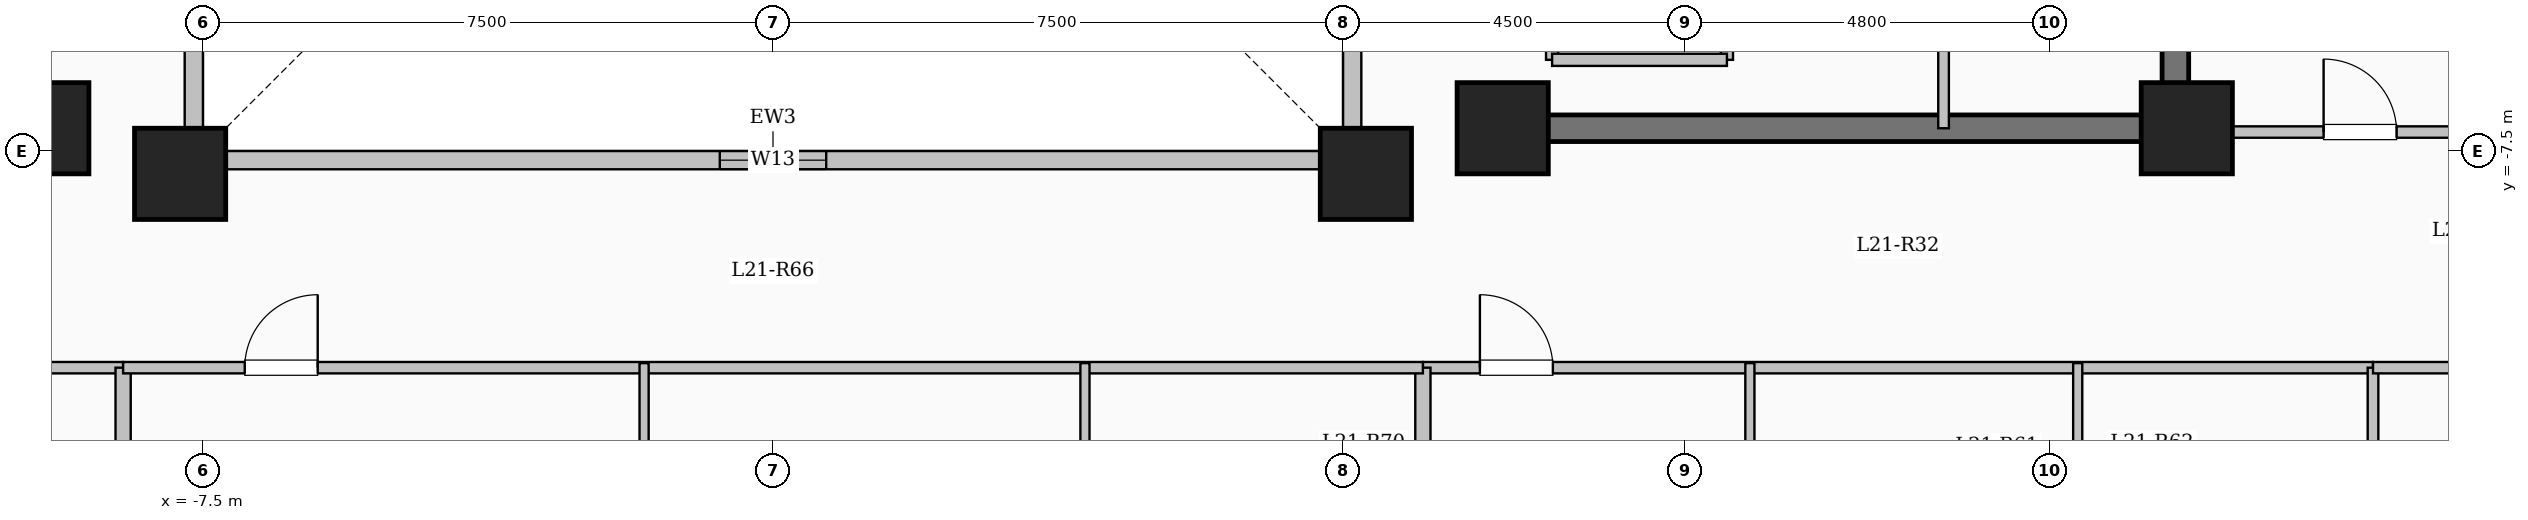
"""IFC4 building model, lengths in metres.
Left out: names, types, materials, properties, quantities, classifications, styles, units other than length and angle.
Written with IfcOpenShell. Run it as: python <this file> out.ifc"""

import sys

from ifc_helpers import new_model, si_unit, direction, frame, frame_2d, origin, origin_2d, place, context, subcontext, project, spatial, rectangle, extrude, element, fill, save


model = new_model("IFC4")
c1 = context("Model", 3, precision=1e-05, world=origin(), true_north=direction((0.0, 1.0)))
c2 = subcontext(c1, "Body", "Model", "MODEL_VIEW")
j1 = project(units=[si_unit("LENGTHUNIT", "METRE"), si_unit("PLANEANGLEUNIT", "RADIAN")], contexts=[c1])
p1 = place(None, origin())
s1 = spatial("IfcSite", under=j1, at=p1, CompositionType="ELEMENT")
p2 = place(p1, origin())
s2 = spatial("IfcBuilding", under=s1, at=p2, CompositionType="ELEMENT")
p3 = place(p2, frame((0.0, 0.0, 81.65)))
s3 = spatial("IfcBuildingStorey", under=s2, at=p3, CompositionType="ELEMENT", Elevation=81.65)
for number, where, z_axis, x_axis in (
    (1, (-7.8, -7.8, 0.0), (0.0, 0.0, 1.0), (1.0, 0.0, 0.0)),
    (2, (7.8, -7.8, 0.0), (0.0, 0.0, 1.0), (1.0, 0.0, 0.0)),
    (3, (-9.6, -7.2, 0.0), (0.0, 0.0, 1.0), (1.0, 0.0, 0.0)),
    (4, (9.6, -7.2, 0.0), (0.0, 0.0, 1.0), (1.0, 0.0, 0.0)),
    (5, (18.6, -7.2, 0.0), (0.0, 0.0, 1.0), (1.0, 0.0, 0.0)),
):
    element("IfcColumn", number, at=place(p3, frame(where, z_axis=z_axis, x_axis=x_axis)), inside=s3, PredefinedType="COLUMN", context=c2, shape_type="SweptSolid", body=[
        extrude(rectangle(XDim=1.2, YDim=1.2, at=origin_2d()), origin(), (0.0, 0.0, 1.0), 3.35),
    ])
p4 = place(p3, frame((-7.62, -7.62, 0.0), z_axis=(0.0, 0.0, 1.0), x_axis=(1.0, 0.0, 0.0)))
e6 = element("IfcWall", 6, at=p4, inside=s3, PredefinedType="SOLIDWALL", context=c2, shape_type="SweptSolid", body=[
    extrude(rectangle(XDim=15.24, YDim=0.24, at=frame_2d((7.62, 0.0))), origin(), (0.0, 0.0, 1.0), 3.1),
])
p5 = place(p4, frame((6.92, 0.0, 0.95)))
e7 = element("IfcOpeningElement", 7, at=p5, cuts=e6, PredefinedType="OPENING", context=c2, shape_type="SweptSolid", body=[
    extrude(rectangle(XDim=1.4, YDim=1.5, at=frame_2d((0.7, 0.75))), frame((0.0, 0.13, 0.0), z_axis=(0.0, -1.0, 0.0), x_axis=(1.0, 0.0, 0.0)), (0.0, 0.0, 1.0), 0.26),
])
p6 = place(p3, frame((7.62, -7.62, 0.0), z_axis=(0.0, 0.0, 1.0), x_axis=(0.0, 1.0, 0.0)))
e8 = element("IfcWall", 8, at=p6, inside=s3, PredefinedType="SOLIDWALL", context=c2, shape_type="SweptSolid", body=[
    extrude(rectangle(XDim=15.24, YDim=0.24, at=frame_2d((7.62, 0.0))), origin(), (0.0, 0.0, 1.0), 3.1),
])
p7 = place(p6, frame((6.92, 0.0, 0.95)))
e9 = element("IfcOpeningElement", 9, at=p7, cuts=e8, PredefinedType="OPENING", context=c2, shape_type="SweptSolid", body=[
    extrude(rectangle(XDim=1.4, YDim=1.5, at=frame_2d((0.7, 0.75))), frame((0.0, 0.13, 0.0), z_axis=(0.0, -1.0, 0.0), x_axis=(1.0, 0.0, 0.0)), (0.0, 0.0, 1.0), 0.26),
])
p8 = place(p3, frame((-7.62, 7.62, 0.0), z_axis=(0.0, 0.0, 1.0), x_axis=(0.0, -1.0, 0.0)))
e10 = element("IfcWall", 10, at=p8, inside=s3, PredefinedType="SOLIDWALL", context=c2, shape_type="SweptSolid", body=[
    extrude(rectangle(XDim=15.24, YDim=0.24, at=frame_2d((7.62, 0.0))), origin(), (0.0, 0.0, 1.0), 3.1),
])
p9 = place(p8, frame((6.92, 0.0, 0.95)))
e11 = element("IfcOpeningElement", 11, at=p9, cuts=e10, PredefinedType="OPENING", context=c2, shape_type="SweptSolid", body=[
    extrude(rectangle(XDim=1.4, YDim=1.5, at=frame_2d((0.7, 0.75))), frame((0.0, 0.13, 0.0), z_axis=(0.0, -1.0, 0.0), x_axis=(1.0, 0.0, 0.0)), (0.0, 0.0, 1.0), 0.26),
])
p10 = place(p3, frame((10.25, -6.3, 0.0), z_axis=(0.0, 0.0, 1.0), x_axis=(0.0, 1.0, 0.0)))
e12 = element("IfcWall", 12, at=p10, inside=s3, PredefinedType="SOLIDWALL", context=c2, shape_type="SweptSolid", body=[
    extrude(rectangle(XDim=2.6, YDim=0.16, at=frame_2d((1.3, 0.0))), origin(), (0.0, 0.0, 1.0), 3.1),
])
p11 = place(p10, frame((0.75, 0.0, 0.0)))
e13 = element("IfcOpeningElement", 13, at=p11, cuts=e12, PredefinedType="OPENING", context=c2, shape_type="SweptSolid", body=[
    extrude(rectangle(XDim=1.1, YDim=2.15, at=frame_2d((0.55, 1.075))), frame((0.0, 0.09, 0.0), z_axis=(0.0, -1.0, 0.0), x_axis=(1.0, 0.0, 0.0)), (0.0, 0.0, 1.0), 0.18),
])
p12 = place(p3, frame((12.55, -6.3, 0.0), z_axis=(0.0, 0.0, 1.0), x_axis=(0.0, 1.0, 0.0)))
e14 = element("IfcWall", 14, at=p12, inside=s3, PredefinedType="SOLIDWALL", context=c2, shape_type="SweptSolid", body=[
    extrude(rectangle(XDim=2.6, YDim=0.16, at=frame_2d((1.3, 0.0))), origin(), (0.0, 0.0, 1.0), 3.1),
])
p13 = place(p3, frame((10.25, -6.3, 0.0), z_axis=(0.0, 0.0, 1.0), x_axis=(1.0, 0.0, 0.0)))
e15 = element("IfcWall", 15, at=p13, inside=s3, PredefinedType="SOLIDWALL", context=c2, shape_type="SweptSolid", body=[
    extrude(rectangle(XDim=2.3, YDim=0.16, at=frame_2d((1.15, 0.0))), origin(), (0.0, 0.0, 1.0), 3.1),
])
p14 = place(p3, frame((18.45, -7.375, 0.0), z_axis=(0.0, 0.0, 1.0), x_axis=(0.0, 1.0, 0.0)))
e16 = element("IfcWall", 16, at=p14, inside=s3, PredefinedType="SHEAR", context=c2, shape_type="SweptSolid", body=[
    extrude(rectangle(XDim=14.05, YDim=0.35, at=frame_2d((7.025, 0.0))), origin(), (0.0, 0.0, 1.0), 3.35),
])
p15 = place(p3, frame((10.075, -7.2, 0.0), z_axis=(0.0, 0.0, 1.0), x_axis=(1.0, 0.0, 0.0)))
e17 = element("IfcWall", 17, at=p15, inside=s3, PredefinedType="SHEAR", context=c2, shape_type="SweptSolid", body=[
    extrude(rectangle(XDim=8.55, YDim=0.35, at=frame_2d((4.275, 0.0))), origin(), (0.0, 0.0, 1.0), 3.35),
])
p16 = place(p3, frame((15.4, -7.2, 0.0), z_axis=(0.0, 0.0, 1.0), x_axis=(0.0, 1.0, 0.0)))
e18 = element("IfcWall", 18, at=p16, inside=s3, PredefinedType="PARTITIONING", context=c2, shape_type="SweptSolid", body=[
    extrude(rectangle(XDim=10.45, YDim=0.14, at=frame_2d((5.225, 0.0))), origin(), (0.0, 0.0, 1.0), 3.1),
])
p17 = place(p16, frame((9.25, 0.0, 0.0)))
e19 = element("IfcOpeningElement", 19, at=p17, cuts=e18, PredefinedType="OPENING", context=c2, shape_type="SweptSolid", body=[
    extrude(rectangle(XDim=0.9, YDim=2.08, at=frame_2d((0.45, 1.04))), frame((0.0, 0.08, 0.0), z_axis=(0.0, -1.0, 0.0), x_axis=(1.0, 0.0, 0.0)), (0.0, 0.0, 1.0), 0.16),
])
p18 = place(p3, frame((-21.05, -10.35, 0.0), z_axis=(0.0, 0.0, 1.0), x_axis=(1.0, 0.0, 0.0)))
e20 = element("IfcWall", 20, at=p18, inside=s3, PredefinedType="PARTITIONING", context=c2, shape_type="SweptSolid", body=[
    extrude(rectangle(XDim=12.5, YDim=0.15, at=frame_2d((6.25, 0.0))), origin(), (0.0, 0.0, 1.0), 3.1),
])
p19 = place(p18, frame((0.7, 0.0, 0.0)))
e21 = element("IfcOpeningElement", 21, at=p19, cuts=e20, PredefinedType="OPENING", context=c2, shape_type="SweptSolid", body=[
    extrude(rectangle(XDim=0.96, YDim=2.15, at=frame_2d((0.48, 1.075))), frame((0.0, 0.085, 0.0), z_axis=(0.0, -1.0, 0.0), x_axis=(1.0, 0.0, 0.0)), (0.0, 0.0, 1.0), 0.17),
])
p20 = place(p18, frame((6.925, 0.0, 0.0)))
e22 = element("IfcOpeningElement", 22, at=p20, cuts=e20, PredefinedType="OPENING", context=c2, shape_type="SweptSolid", body=[
    extrude(rectangle(XDim=0.96, YDim=2.15, at=frame_2d((0.48, 1.075))), frame((0.0, 0.085, 0.0), z_axis=(0.0, -1.0, 0.0), x_axis=(1.0, 0.0, 0.0)), (0.0, 0.0, 1.0), 0.17),
])
p21 = place(p3, frame((8.55, -10.35, 0.0), z_axis=(0.0, 0.0, 1.0), x_axis=(1.0, 0.0, 0.0)))
e23 = element("IfcWall", 23, at=p21, inside=s3, PredefinedType="PARTITIONING", context=c2, shape_type="SweptSolid", body=[
    extrude(rectangle(XDim=12.5, YDim=0.15, at=frame_2d((6.25, 0.0))), origin(), (0.0, 0.0, 1.0), 3.1),
])
p22 = place(p21, frame((0.75, 0.0, 0.0)))
e24 = element("IfcOpeningElement", 24, at=p22, cuts=e23, PredefinedType="OPENING", context=c2, shape_type="SweptSolid", body=[
    extrude(rectangle(XDim=0.96, YDim=2.15, at=frame_2d((0.48, 1.075))), frame((0.0, 0.085, 0.0), z_axis=(0.0, -1.0, 0.0), x_axis=(1.0, 0.0, 0.0)), (0.0, 0.0, 1.0), 0.17),
])
p23 = place(p3, frame((12.852, -22.1, 0.0), z_axis=(0.0, 0.0, 1.0), x_axis=(0.0, 1.0, 0.0)))
e25 = element("IfcWall", 25, at=p23, inside=s3, PredefinedType="PARTITIONING", context=c2, shape_type="SweptSolid", body=[
    extrude(rectangle(XDim=11.81, YDim=0.12, at=frame_2d((5.905, 0.0))), origin(), (0.0, 0.0, 1.0), 3.1),
])
p24 = place(p23, frame((7.475, 0.0, 0.0)))
e26 = element("IfcOpeningElement", 26, at=p24, cuts=e25, PredefinedType="OPENING", context=c2, shape_type="SweptSolid", body=[
    extrude(rectangle(XDim=1.08, YDim=2.15, at=frame_2d((0.54, 1.075))), frame((0.0, 0.07, 0.0), z_axis=(0.0, -1.0, 0.0), x_axis=(1.0, 0.0, 0.0)), (0.0, 0.0, 1.0), 0.14),
])
p25 = place(p3, frame((17.165, -13.26, 0.0), z_axis=(0.0, 0.0, 1.0), x_axis=(0.0, 1.0, 0.0)))
e27 = element("IfcWall", 27, at=p25, inside=s3, PredefinedType="PARTITIONING", context=c2, shape_type="SweptSolid", body=[
    extrude(rectangle(XDim=2.97, YDim=0.12, at=frame_2d((1.485, 0.0))), origin(), (0.0, 0.0, 1.0), 3.1),
])
for number, where, z_axis, x_axis in (
    (28, (-8.55, -22.704, 0.0), (0.0, 0.0, 1.0), (0.0, 1.0, 0.0)),
    (29, (8.55, -22.704, 0.0), (0.0, 0.0, 1.0), (0.0, 1.0, 0.0)),
):
    element("IfcWall", number, at=place(p3, frame(where, z_axis=z_axis, x_axis=x_axis)), inside=s3, PredefinedType="SOLIDWALL", context=c2, shape_type="SweptSolid", body=[
        extrude(rectangle(XDim=12.354, YDim=0.2, at=frame_2d((6.177, 0.0))), origin(), (0.0, 0.0, 1.0), 3.1),
    ])
p26 = place(p3, frame((-8.55, -10.35, 0.0), z_axis=(0.0, 0.0, 1.0), x_axis=(1.0, 0.0, 0.0)))
e30 = element("IfcWall", 30, at=p26, inside=s3, PredefinedType="PARTITIONING", context=c2, shape_type="SweptSolid", body=[
    extrude(rectangle(XDim=17.1, YDim=0.15, at=frame_2d((8.55, 0.0))), origin(), (0.0, 0.0, 1.0), 3.1),
])
p27 = place(p26, frame((1.6, 0.0, 0.0)))
e31 = element("IfcOpeningElement", 31, at=p27, cuts=e30, PredefinedType="OPENING", context=c2, shape_type="SweptSolid", body=[
    extrude(rectangle(XDim=0.96, YDim=2.15, at=frame_2d((0.48, 1.075))), frame((0.0, 0.085, 0.0), z_axis=(0.0, -1.0, 0.0), x_axis=(1.0, 0.0, 0.0)), (0.0, 0.0, 1.0), 0.17),
])
p28 = place(p3, frame((-1.696, -23.58, 0.0), z_axis=(0.0, 0.0, 1.0), x_axis=(0.0, 1.0, 0.0)))
e32 = element("IfcWall", 32, at=p28, inside=s3, PredefinedType="PARTITIONING", context=c2, shape_type="SweptSolid", body=[
    extrude(rectangle(XDim=13.29, YDim=0.12, at=frame_2d((6.645, 0.0))), origin(), (0.0, 0.0, 1.0), 3.1),
])
p29 = place(p28, frame((9.465, 0.0, 0.0)))
e33 = element("IfcOpeningElement", 33, at=p29, cuts=e32, PredefinedType="OPENING", context=c2, shape_type="SweptSolid", body=[
    extrude(rectangle(XDim=1.08, YDim=2.15, at=frame_2d((0.54, 1.075))), frame((0.0, 0.07, 0.0), z_axis=(0.0, -1.0, 0.0), x_axis=(1.0, 0.0, 0.0)), (0.0, 0.0, 1.0), 0.14),
])
p30 = place(p3, frame((4.104, -12.75, 0.0), z_axis=(0.0, 0.0, 1.0), x_axis=(0.0, 1.0, 0.0)))
e34 = element("IfcWall", 34, at=p30, inside=s3, PredefinedType="PARTITIONING", context=c2, shape_type="SweptSolid", body=[
    extrude(rectangle(XDim=2.46, YDim=0.12, at=frame_2d((1.23, 0.0))), origin(), (0.0, 0.0, 1.0), 3.1),
])
p31 = place(p3, frame((18.45, -7.25, 0.0), z_axis=(0.0, 0.0, 1.0), x_axis=(1.0, 0.0, 0.0)))
e35 = element("IfcWall", 35, at=p31, inside=s3, PredefinedType="PARTITIONING", context=c2, shape_type="SweptSolid", body=[
    extrude(rectangle(XDim=8.43, YDim=0.15, at=frame_2d((4.215, 0.0))), origin(), (0.0, 0.0, 1.0), 3.1),
])
p32 = place(p31, frame((1.95, 0.0, 0.0)))
e36 = element("IfcOpeningElement", 36, at=p32, cuts=e35, PredefinedType="OPENING", context=c2, shape_type="SweptSolid", body=[
    extrude(rectangle(XDim=0.96, YDim=2.15, at=frame_2d((0.48, 1.075))), frame((0.0, 0.085, 0.0), z_axis=(0.0, -1.0, 0.0), x_axis=(1.0, 0.0, 0.0)), (0.0, 0.0, 1.0), 0.17),
])
p33 = place(p3, frame((21.05, -17.85, 0.0), z_axis=(0.0, 0.0, 1.0), x_axis=(0.0, 1.0, 0.0)))
e37 = element("IfcWall", 37, at=p33, inside=s3, PredefinedType="PARTITIONING", context=c2, shape_type="SweptSolid", body=[
    extrude(rectangle(XDim=7.5, YDim=0.14, at=frame_2d((3.75, 0.0))), origin(), (0.0, 0.0, 1.0), 3.1),
])
p34 = place(p3, frame((21.05, -10.35, 0.0), z_axis=(0.0, 0.0, 1.0), x_axis=(1.0, 0.0, 0.0)))
e38 = element("IfcWall", 38, at=p34, inside=s3, PredefinedType="PARTITIONING", context=c2, shape_type="SweptSolid", body=[
    extrude(rectangle(XDim=5.83, YDim=0.15, at=frame_2d((2.915, 0.0))), origin(), (0.0, 0.0, 1.0), 3.1),
])
p35 = place(p34, frame((2.44, 0.0, 0.0)))
e39 = element("IfcOpeningElement", 39, at=p35, cuts=e38, PredefinedType="OPENING", context=c2, shape_type="SweptSolid", body=[
    extrude(rectangle(XDim=0.95, YDim=2.15, at=frame_2d((0.475, 1.075))), frame((0.0, 0.085, 0.0), z_axis=(0.0, -1.0, 0.0), x_axis=(1.0, 0.0, 0.0)), (0.0, 0.0, 1.0), 0.17),
])
p36 = place(p5, origin())
e40 = element("IfcWindow", 40, at=p36, inside=s3, PartitioningType="SINGLE_PANEL", PredefinedType="WINDOW", context=c2, shape_type="SweptSolid", body=[
    extrude(rectangle(XDim=1.4, YDim=1.5, at=frame_2d((0.7, 0.75))), frame((0.0, 0.03, 0.0), z_axis=(0.0, -1.0, 0.0), x_axis=(1.0, 0.0, 0.0)), (0.0, 0.0, 1.0), 0.06),
])
fill(e7, e40)
p37 = place(p22, origin())
e41 = element("IfcDoor", 41, at=p37, inside=s3, OperationType="SINGLE_SWING_LEFT", PredefinedType="DOOR", context=c2, shape_type="SweptSolid", body=[
    extrude(rectangle(XDim=0.96, YDim=2.15, at=frame_2d((0.48, 1.075))), frame((0.0, 0.025, 0.0), z_axis=(0.0, -1.0, 0.0), x_axis=(1.0, 0.0, 0.0)), (0.0, 0.0, 1.0), 0.05),
])
fill(e24, e41)
p38 = place(p27, origin())
e42 = element("IfcDoor", 42, at=p38, inside=s3, OperationType="SINGLE_SWING_RIGHT", PredefinedType="DOOR", context=c2, shape_type="SweptSolid", body=[
    extrude(rectangle(XDim=0.96, YDim=2.15, at=frame_2d((0.48, 1.075))), frame((0.0, 0.025, 0.0), z_axis=(0.0, -1.0, 0.0), x_axis=(1.0, 0.0, 0.0)), (0.0, 0.0, 1.0), 0.05),
])
fill(e31, e42)
p39 = place(p32, origin())
e43 = element("IfcDoor", 43, at=p39, inside=s3, OperationType="SINGLE_SWING_LEFT", PredefinedType="DOOR", context=c2, shape_type="SweptSolid", body=[
    extrude(rectangle(XDim=0.96, YDim=2.15, at=frame_2d((0.48, 1.075))), frame((0.0, 0.025, 0.0), z_axis=(0.0, -1.0, 0.0), x_axis=(1.0, 0.0, 0.0)), (0.0, 0.0, 1.0), 0.05),
])
fill(e36, e43)
save(model, sys.argv[1])
